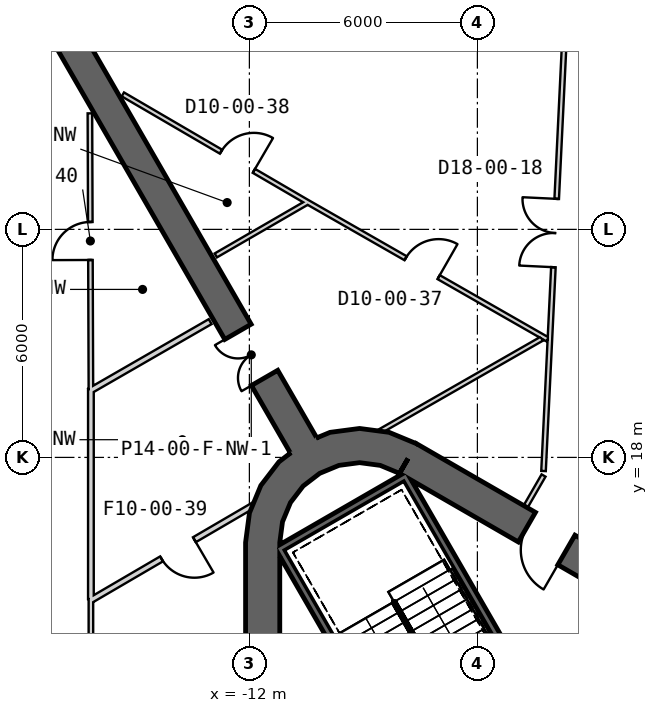
"""IFC4 building model, lengths in metres.
Left out: names, types, materials, properties, quantities, classifications, styles, units other than length and angle.
Written with IfcOpenShell. Run it as: python <this file> out.ifc"""

import sys

from ifc_helpers import new_model, si_unit, direction, frame, frame_2d, origin, place, context, subcontext, project, spatial, polyline, rectangle, outline, extrude, element, fill, save


model = new_model("IFC4")
c1 = context("Model", 3, precision=1e-05, world=origin(), true_north=direction((0.0, 1.0)))
c2 = subcontext(c1, "Body", "Model", "MODEL_VIEW")
j1 = project(units=[si_unit("LENGTHUNIT", "METRE"), si_unit("PLANEANGLEUNIT", "RADIAN")], contexts=[c1])
p1 = place(None, origin())
s1 = spatial("IfcSite", under=j1, at=p1, CompositionType="ELEMENT")
p2 = place(p1, origin())
s2 = spatial("IfcBuilding", under=s1, at=p2, CompositionType="ELEMENT")
p3 = place(p2, origin())
s3 = spatial("IfcBuildingStorey", under=s2, at=p3, CompositionType="ELEMENT", Elevation=0.0)
p4 = place(p3, frame((19.475, 2.208, 0.0), z_axis=(0.0, 0.0, 1.0), x_axis=(-0.866028369851, 0.499994862586, 0.0)))
e1 = element("IfcWall", 1, at=p4, inside=s3, PredefinedType="SHEAR", context=c2, shape_type="SweptSolid", body=[
    extrude(rectangle(XDim=31.523, YDim=0.9, at=frame_2d((15.762, 0.0))), origin(), (0.0, 0.0, 1.0), 9.0),
])
p5 = place(p4, frame((7.062, 0.0, 0.0)))
e2 = element("IfcOpeningElement", 2, at=p5, cuts=e1, PredefinedType="OPENING", context=c2, shape_type="SweptSolid", body=[
    extrude(rectangle(XDim=1.2, YDim=2.4, at=frame_2d((0.6, 1.2))), frame((0.0, 0.46, 0.0), z_axis=(0.0, -1.0, 0.0), x_axis=(1.0, 0.0, 0.0)), (0.0, 0.0, 1.0), 0.92),
])
p6 = place(p4, frame((9.762, 0.0, 0.0)))
e3 = element("IfcOpeningElement", 3, at=p6, cuts=e1, PredefinedType="OPENING", context=c2, shape_type="SweptSolid", body=[
    extrude(rectangle(XDim=1.2, YDim=2.4, at=frame_2d((0.6, 1.2))), frame((0.0, 0.46, 0.0), z_axis=(0.0, -1.0, 0.0), x_axis=(1.0, 0.0, 0.0)), (0.0, 0.0, 1.0), 0.92),
])
p7 = place(p4, frame((12.462, 0.0, 0.0)))
e4 = element("IfcOpeningElement", 4, at=p7, cuts=e1, PredefinedType="OPENING", context=c2, shape_type="SweptSolid", body=[
    extrude(rectangle(XDim=1.2, YDim=2.4, at=frame_2d((0.6, 1.2))), frame((0.0, 0.46, 0.0), z_axis=(0.0, -1.0, 0.0), x_axis=(1.0, 0.0, 0.0)), (0.0, 0.0, 1.0), 0.92),
])
p8 = place(p4, frame((15.162, 0.0, 0.0)))
e5 = element("IfcOpeningElement", 5, at=p8, cuts=e1, PredefinedType="OPENING", context=c2, shape_type="SweptSolid", body=[
    extrude(rectangle(XDim=1.2, YDim=2.4, at=frame_2d((0.6, 1.2))), frame((0.0, 0.46, 0.0), z_axis=(0.0, -1.0, 0.0), x_axis=(1.0, 0.0, 0.0)), (0.0, 0.0, 1.0), 0.92),
])
p9 = place(p4, frame((17.862, 0.0, 0.0)))
e6 = element("IfcOpeningElement", 6, at=p9, cuts=e1, PredefinedType="OPENING", context=c2, shape_type="SweptSolid", body=[
    extrude(rectangle(XDim=1.2, YDim=2.4, at=frame_2d((0.6, 1.2))), frame((0.0, 0.46, 0.0), z_axis=(0.0, -1.0, 0.0), x_axis=(1.0, 0.0, 0.0)), (0.0, 0.0, 1.0), 0.92),
])
p10 = place(p4, frame((20.562, 0.0, 0.0)))
e7 = element("IfcOpeningElement", 7, at=p10, cuts=e1, PredefinedType="OPENING", context=c2, shape_type="SweptSolid", body=[
    extrude(rectangle(XDim=1.2, YDim=2.4, at=frame_2d((0.6, 1.2))), frame((0.0, 0.46, 0.0), z_axis=(0.0, -1.0, 0.0), x_axis=(1.0, 0.0, 0.0)), (0.0, 0.0, 1.0), 0.92),
])
p11 = place(p4, frame((23.262, 0.0, 0.0)))
e8 = element("IfcOpeningElement", 8, at=p11, cuts=e1, PredefinedType="OPENING", context=c2, shape_type="SweptSolid", body=[
    extrude(rectangle(XDim=1.2, YDim=2.4, at=frame_2d((0.6, 1.2))), frame((0.0, 0.46, 0.0), z_axis=(0.0, -1.0, 0.0), x_axis=(1.0, 0.0, 0.0)), (0.0, 0.0, 1.0), 0.92),
])
p12 = place(p4, frame((3.612, 0.0, 0.0)))
e9 = element("IfcOpeningElement", 9, at=p12, cuts=e1, PredefinedType="OPENING", context=c2, shape_type="SweptSolid", body=[
    extrude(rectangle(XDim=1.2, YDim=2.4, at=frame_2d((0.6, 1.2))), frame((0.0, 0.46, 0.0), z_axis=(0.0, -1.0, 0.0), x_axis=(1.0, 0.0, 0.0)), (0.0, 0.0, 1.0), 0.92),
])
p13 = place(p4, frame((26.712, 0.0, 0.0)))
e10 = element("IfcOpeningElement", 10, at=p13, cuts=e1, PredefinedType="OPENING", context=c2, shape_type="SweptSolid", body=[
    extrude(rectangle(XDim=1.2, YDim=2.4, at=frame_2d((0.6, 1.2))), frame((0.0, 0.46, 0.0), z_axis=(0.0, -1.0, 0.0), x_axis=(1.0, 0.0, 0.0)), (0.0, 0.0, 1.0), 0.92),
])
p14 = place(p3, frame((-11.65, 15.762, 0.0), z_axis=(0.0, 0.0, 1.0), x_axis=(0.0, -1.0, 0.0)))
e11 = element("IfcWall", 11, at=p14, inside=s3, PredefinedType="SHEAR", context=c2, shape_type="SweptSolid", body=[
    extrude(rectangle(XDim=31.523, YDim=0.9, at=frame_2d((15.762, 0.0))), origin(), (0.0, 0.0, 1.0), 9.0),
])
p15 = place(p14, frame((7.062, 0.0, 0.0)))
e12 = element("IfcOpeningElement", 12, at=p15, cuts=e11, PredefinedType="OPENING", context=c2, shape_type="SweptSolid", body=[
    extrude(rectangle(XDim=1.2, YDim=2.4, at=frame_2d((0.6, 1.2))), frame((0.0, 0.46, 0.0), z_axis=(0.0, -1.0, 0.0), x_axis=(1.0, 0.0, 0.0)), (0.0, 0.0, 1.0), 0.92),
])
p16 = place(p14, frame((9.762, 0.0, 0.0)))
e13 = element("IfcOpeningElement", 13, at=p16, cuts=e11, PredefinedType="OPENING", context=c2, shape_type="SweptSolid", body=[
    extrude(rectangle(XDim=1.2, YDim=2.4, at=frame_2d((0.6, 1.2))), frame((0.0, 0.46, 0.0), z_axis=(0.0, -1.0, 0.0), x_axis=(1.0, 0.0, 0.0)), (0.0, 0.0, 1.0), 0.92),
])
p17 = place(p14, frame((12.462, 0.0, 0.0)))
e14 = element("IfcOpeningElement", 14, at=p17, cuts=e11, PredefinedType="OPENING", context=c2, shape_type="SweptSolid", body=[
    extrude(rectangle(XDim=1.2, YDim=2.4, at=frame_2d((0.6, 1.2))), frame((0.0, 0.46, 0.0), z_axis=(0.0, -1.0, 0.0), x_axis=(1.0, 0.0, 0.0)), (0.0, 0.0, 1.0), 0.92),
])
p18 = place(p14, frame((15.162, 0.0, 0.0)))
e15 = element("IfcOpeningElement", 15, at=p18, cuts=e11, PredefinedType="OPENING", context=c2, shape_type="SweptSolid", body=[
    extrude(rectangle(XDim=1.2, YDim=2.4, at=frame_2d((0.6, 1.2))), frame((0.0, 0.46, 0.0), z_axis=(0.0, -1.0, 0.0), x_axis=(1.0, 0.0, 0.0)), (0.0, 0.0, 1.0), 0.92),
])
p19 = place(p14, frame((17.862, 0.0, 0.0)))
e16 = element("IfcOpeningElement", 16, at=p19, cuts=e11, PredefinedType="OPENING", context=c2, shape_type="SweptSolid", body=[
    extrude(rectangle(XDim=1.2, YDim=2.4, at=frame_2d((0.6, 1.2))), frame((0.0, 0.46, 0.0), z_axis=(0.0, -1.0, 0.0), x_axis=(1.0, 0.0, 0.0)), (0.0, 0.0, 1.0), 0.92),
])
p20 = place(p14, frame((20.562, 0.0, 0.0)))
e17 = element("IfcOpeningElement", 17, at=p20, cuts=e11, PredefinedType="OPENING", context=c2, shape_type="SweptSolid", body=[
    extrude(rectangle(XDim=1.2, YDim=2.4, at=frame_2d((0.6, 1.2))), frame((0.0, 0.46, 0.0), z_axis=(0.0, -1.0, 0.0), x_axis=(1.0, 0.0, 0.0)), (0.0, 0.0, 1.0), 0.92),
])
p21 = place(p14, frame((23.262, 0.0, 0.0)))
e18 = element("IfcOpeningElement", 18, at=p21, cuts=e11, PredefinedType="OPENING", context=c2, shape_type="SweptSolid", body=[
    extrude(rectangle(XDim=1.2, YDim=2.4, at=frame_2d((0.6, 1.2))), frame((0.0, 0.46, 0.0), z_axis=(0.0, -1.0, 0.0), x_axis=(1.0, 0.0, 0.0)), (0.0, 0.0, 1.0), 0.92),
])
p22 = place(p14, frame((3.612, 0.0, 0.0)))
e19 = element("IfcOpeningElement", 19, at=p22, cuts=e11, PredefinedType="OPENING", context=c2, shape_type="SweptSolid", body=[
    extrude(rectangle(XDim=1.2, YDim=2.4, at=frame_2d((0.6, 1.2))), frame((0.0, 0.46, 0.0), z_axis=(0.0, -1.0, 0.0), x_axis=(1.0, 0.0, 0.0)), (0.0, 0.0, 1.0), 0.92),
])
p23 = place(p14, frame((26.712, 0.0, 0.0)))
e20 = element("IfcOpeningElement", 20, at=p23, cuts=e11, PredefinedType="OPENING", context=c2, shape_type="SweptSolid", body=[
    extrude(rectangle(XDim=1.2, YDim=2.4, at=frame_2d((0.6, 1.2))), frame((0.0, 0.46, 0.0), z_axis=(0.0, -1.0, 0.0), x_axis=(1.0, 0.0, 0.0)), (0.0, 0.0, 1.0), 0.92),
])
p24 = place(p3, origin())
e21 = element("IfcWall", 21, at=p24, inside=s3, PredefinedType="SHEAR", context=c2, shape_type="SweptSolid", body=[
    extrude(outline(polyline([(-7.6, 18.36), (-8.323, 18.659), (-9.1, 18.762), (-9.876, 18.659), (-10.6, 18.36), (-11.221, 17.883), (-11.698, 17.262), (-11.998, 16.538), (-12.1, 15.762), (-11.2, 15.762), (-11.128, 16.305), (-10.919, 16.812), (-10.585, 17.247), (-10.15, 17.58), (-9.644, 17.79), (-9.1, 17.862), (-8.556, 17.79), (-8.05, 17.58), (-7.6, 18.36)])), origin(), (0.0, 0.0, 1.0), 9.0),
])
p25 = place(p3, frame((-10.575, 18.316, 0.0), z_axis=(0.0, 0.0, 1.0), x_axis=(-0.499996575515, 0.866027380903, 0.0)))
e22 = element("IfcWall", 22, at=p25, inside=s3, PredefinedType="SHEAR", context=c2, shape_type="SweptSolid", body=[
    extrude(rectangle(XDim=13.954, YDim=0.8, at=frame_2d((6.977, 0.0))), origin(), (0.0, 0.0, 1.0), 9.0),
])
p26 = place(p25, frame((2.05, 0.0, 0.0)))
e23 = element("IfcOpeningElement", 23, at=p26, cuts=e22, PredefinedType="OPENING", context=c2, shape_type="SweptSolid", body=[
    extrude(rectangle(XDim=1.4, YDim=2.4, at=frame_2d((0.7, 1.2))), frame((0.0, 0.41, 0.0), z_axis=(0.0, -1.0, 0.0), x_axis=(1.0, 0.0, 0.0)), (0.0, 0.0, 1.0), 0.82),
])
p27 = place(p3, frame((-4.158, 11.696, 0.0), z_axis=(0.0, 0.0, 1.0), x_axis=(0.508018930956, 0.861345903683, 0.0)))
e24 = element("IfcWall", 24, at=p27, inside=s3, PredefinedType="PLUMBINGWALL", context=c2, shape_type="SweptSolid", body=[
    extrude(rectangle(XDim=3.15, YDim=0.2, at=frame_2d((1.575, 0.0))), origin(), (0.0, 0.0, 1.0), 8.7),
])
p28 = place(p3, frame((-11.245, 15.678, -0.4), z_axis=(0.0, 0.0, 1.0), x_axis=(0.499977274689, -0.866038523851, 0.0)))
e25 = element("IfcWall", 25, at=p28, inside=s3, PredefinedType="SHEAR", context=c2, shape_type="SweptSolid", body=[
    extrude(rectangle(XDim=8.1, YDim=0.2, at=frame_2d((4.05, 0.0))), origin(), (0.0, 0.0, 1.0), 9.1),
])
p29 = place(p3, frame((-7.818, 17.541, -0.4), z_axis=(0.0, 0.0, 1.0), x_axis=(-0.866044365799, -0.499967155389, 0.0)))
e26 = element("IfcWall", 26, at=p29, inside=s3, PredefinedType="SHEAR", context=c2, shape_type="SweptSolid", body=[
    extrude(rectangle(XDim=3.8, YDim=0.2, at=frame_2d((1.9, 0.0))), origin(), (0.0, 0.0, 1.0), 9.1),
])
p30 = place(p3, frame((-7.854, 17.405, -0.4), z_axis=(0.0, 0.0, 1.0), x_axis=(0.499997992926, -0.866026562566, 0.0)))
e27 = element("IfcWall", 27, at=p30, inside=s3, PredefinedType="SHEAR", context=c2, shape_type="SweptSolid", body=[
    extrude(rectangle(XDim=7.9, YDim=0.2, at=frame_2d((3.95, 0.0))), origin(), (0.0, 0.0, 1.0), 9.1),
])
p31 = place(p3, frame((-11.74, 16.832, 0.0), z_axis=(0.0, 0.0, 1.0), x_axis=(-0.863501067027, -0.504347010741, 0.0)))
e28 = element("IfcWall", 28, at=p31, inside=s3, PredefinedType="PLUMBINGWALL", context=c2, shape_type="SweptSolid", body=[
    extrude(rectangle(XDim=5.166, YDim=0.15, at=frame_2d((2.583, 0.0))), origin(), (0.0, 0.0, 1.0), 7.78),
])
p32 = place(p31, frame((1.977, 0.0, 0.0)))
e29 = element("IfcOpeningElement", 29, at=p32, cuts=e28, PredefinedType="OPENING", context=c2, shape_type="SweptSolid", body=[
    extrude(rectangle(XDim=1.0, YDim=2.1, at=frame_2d((0.5, 1.05))), frame((0.0, 0.085, 0.0), z_axis=(0.0, -1.0, 0.0), x_axis=(1.0, 0.0, 0.0)), (0.0, 0.0, 1.0), 0.17),
])
p33 = place(p3, frame((-16.17, 14.273, 0.0), z_axis=(0.0, 0.0, 1.0), x_axis=(0.0, -1.0, 0.0)))
e30 = element("IfcWall", 30, at=p33, inside=s3, PredefinedType="PARTITIONING", context=c2, shape_type="SweptSolid", body=[
    extrude(rectangle(XDim=26.35, YDim=0.12, at=frame_2d((13.175, 0.0))), origin(), (0.0, 0.0, 1.0), 8.08),
])
p34 = place(p33, frame((19.314, 0.0, 0.0)))
e31 = element("IfcOpeningElement", 31, at=p34, cuts=e30, PredefinedType="OPENING", context=c2, shape_type="SweptSolid", body=[
    extrude(rectangle(XDim=1.8, YDim=2.1, at=frame_2d((0.9, 1.05))), frame((0.0, 0.07, 0.0), z_axis=(0.0, -1.0, 0.0), x_axis=(1.0, 0.0, 0.0)), (0.0, 0.0, 1.0), 0.14),
])
p35 = place(p33, frame((12.314, 0.0, 0.0)))
e32 = element("IfcOpeningElement", 32, at=p35, cuts=e30, PredefinedType="OPENING", context=c2, shape_type="SweptSolid", body=[
    extrude(rectangle(XDim=1.8, YDim=2.1, at=frame_2d((0.9, 1.05))), frame((0.0, 0.07, 0.0), z_axis=(0.0, -1.0, 0.0), x_axis=(1.0, 0.0, 0.0)), (0.0, 0.0, 1.0), 0.14),
])
p36 = place(p33, frame((5.314, 0.0, 0.0)))
e33 = element("IfcOpeningElement", 33, at=p36, cuts=e30, PredefinedType="OPENING", context=c2, shape_type="SweptSolid", body=[
    extrude(rectangle(XDim=1.8, YDim=2.1, at=frame_2d((0.9, 1.05))), frame((0.0, 0.07, 0.0), z_axis=(0.0, -1.0, 0.0), x_axis=(1.0, 0.0, 0.0)), (0.0, 0.0, 1.0), 0.14),
])
p37 = place(p3, frame((-10.436, 24.731, 0.0), z_axis=(0.0, 0.0, 1.0), x_axis=(-0.865418403418, -0.501049884768, 0.0)))
e34 = element("IfcWall", 34, at=p37, inside=s3, PredefinedType="PARTITIONING", context=c2, shape_type="SweptSolid", body=[
    extrude(rectangle(XDim=2.828, YDim=0.12, at=frame_2d((1.414, 0.0))), origin(), (0.0, 0.0, 1.0), 8.7),
])
p38 = place(p3, frame((-10.492, 24.729, 0.0), z_axis=(0.0, 0.0, 1.0), x_axis=(0.868099034647, -0.496391041464, 0.0)))
e35 = element("IfcWall", 35, at=p38, inside=s3, PredefinedType="PARTITIONING", context=c2, shape_type="SweptSolid", body=[
    extrude(rectangle(XDim=7.3, YDim=0.12, at=frame_2d((3.65, 0.0))), origin(), (0.0, 0.0, 1.0), 7.78),
])
p39 = place(p38, frame((3.0, 0.0, 0.0)))
e36 = element("IfcOpeningElement", 36, at=p39, cuts=e35, PredefinedType="OPENING", context=c2, shape_type="SweptSolid", body=[
    extrude(rectangle(XDim=1.0, YDim=2.1, at=frame_2d((0.5, 1.05))), frame((0.0, 0.07, 0.0), z_axis=(0.0, -1.0, 0.0), x_axis=(1.0, 0.0, 0.0)), (0.0, 0.0, 1.0), 0.14),
])
p40 = place(p3, frame((-8.736, 18.588, 0.0), z_axis=(0.0, 0.0, 1.0), x_axis=(0.867892636673, 0.496751820539, 0.0)))
e37 = element("IfcWall", 37, at=p40, inside=s3, PredefinedType="PARTITIONING", context=c2, shape_type="SweptSolid", body=[
    extrude(rectangle(XDim=5.104, YDim=0.12, at=frame_2d((2.552, 0.0))), origin(), (0.0, 0.0, 1.0), 7.78),
])
p41 = place(p3, frame((-15.329, 27.551, 0.0), z_axis=(0.0, 0.0, 1.0), x_axis=(0.863752019717, -0.503917104725, 0.0)))
e38 = element("IfcWall", 38, at=p41, inside=s3, PredefinedType="PARTITIONING", context=c2, shape_type="SweptSolid", body=[
    extrude(rectangle(XDim=5.6, YDim=0.12, at=frame_2d((2.8, 0.0))), origin(), (0.0, 0.0, 1.0), 8.7),
])
p42 = place(p41, frame((2.992, 0.0, 0.0)))
e39 = element("IfcOpeningElement", 39, at=p42, cuts=e38, PredefinedType="OPENING", context=c2, shape_type="SweptSolid", body=[
    extrude(rectangle(XDim=1.0, YDim=2.1, at=frame_2d((0.5, 1.05))), frame((0.0, 0.07, 0.0), z_axis=(0.0, -1.0, 0.0), x_axis=(1.0, 0.0, 0.0)), (0.0, 0.0, 1.0), 0.14),
])
p43 = place(p3, frame((-13.032, 21.572, 0.0), z_axis=(0.0, 0.0, 1.0), x_axis=(-0.866491166515, -0.499192406143, 0.0)))
e40 = element("IfcWall", 40, at=p43, inside=s3, PredefinedType="PLUMBINGWALL", context=c2, shape_type="SweptSolid", body=[
    extrude(rectangle(XDim=3.656, YDim=0.15, at=frame_2d((1.828, 0.0))), origin(), (0.0, 0.0, 1.0), 7.78),
])
p44 = place(p3, frame((-16.17, 14.273, 0.0), z_axis=(0.0, 0.0, 1.0), x_axis=(0.0, 1.0, 0.0)))
e41 = element("IfcWall", 41, at=p44, inside=s3, PredefinedType="PLUMBINGWALL", context=c2, shape_type="SweptSolid", body=[
    extrude(rectangle(XDim=5.521, YDim=0.15, at=frame_2d((2.761, 0.0))), origin(), (0.0, 0.0, 1.0), 7.88),
])
p45 = place(p3, frame((-16.17, 19.795, 0.0), z_axis=(0.0, 0.0, 1.0), x_axis=(-0.003632670279, 0.999993401832, 0.0)))
e42 = element("IfcWall", 42, at=p45, inside=s3, PredefinedType="PARTITIONING", context=c2, shape_type="SweptSolid", body=[
    extrude(rectangle(XDim=7.258, YDim=0.12, at=frame_2d((3.629, 0.0))), origin(), (0.0, 0.0, 1.0), 7.78),
])
p46 = place(p45, frame((3.4, 0.0, 0.0)))
e43 = element("IfcOpeningElement", 43, at=p46, cuts=e42, PredefinedType="OPENING", context=c2, shape_type="SweptSolid", body=[
    extrude(rectangle(XDim=1.0, YDim=2.1, at=frame_2d((0.5, 1.05))), frame((0.0, 0.07, 0.0), z_axis=(0.0, -1.0, 0.0), x_axis=(1.0, 0.0, 0.0)), (0.0, 0.0, 1.0), 0.14),
])
p47 = place(p3, frame((-4.747, 16.678, 0.0), z_axis=(0.0, 0.0, 1.0), x_axis=(0.500011000363, 0.866019052629, 0.0)))
e44 = element("IfcWall", 44, at=p47, inside=s3, PredefinedType="PARTITIONING", context=c2, shape_type="SweptSolid", body=[
    extrude(rectangle(XDim=0.977, YDim=0.12, at=frame_2d((0.488, 0.0))), origin(), (0.0, 0.0, 1.0), 7.88),
])
p48 = place(p3, frame((-3.653, 30.171, 0.0), z_axis=(0.0, 0.0, 1.0), x_axis=(-0.048366881974, -0.99882963749, 0.0)))
e45 = element("IfcWall", 45, at=p48, inside=s3, PredefinedType="PARTITIONING", context=c2, shape_type="SweptSolid", body=[
    extrude(rectangle(XDim=12.543, YDim=0.12, at=frame_2d((6.272, 0.0))), origin(), (0.0, 0.0, 1.0), 7.88),
])
p49 = place(p48, frame((5.375, 0.0, 0.0)))
e46 = element("IfcOpeningElement", 46, at=p49, cuts=e45, PredefinedType="OPENING", context=c2, shape_type="SweptSolid", body=[
    extrude(rectangle(XDim=1.8, YDim=2.1, at=frame_2d((0.9, 1.05))), frame((0.0, 0.07, 0.0), z_axis=(0.0, -1.0, 0.0), x_axis=(1.0, 0.0, 0.0)), (0.0, 0.0, 1.0), 0.14),
])
p50 = place(p49, origin())
e47 = element("IfcDoor", 47, at=p50, inside=s3, OperationType="DOUBLE_DOOR_SINGLE_SWING", PredefinedType="NOTDEFINED", context=c2, shape_type="SweptSolid", body=[
    extrude(rectangle(XDim=1.8, YDim=2.1, at=frame_2d((0.9, 1.05))), frame((0.0, 0.025, 0.0), z_axis=(0.0, -1.0, 0.0), x_axis=(1.0, 0.0, 0.0)), (0.0, 0.0, 1.0), 0.05),
])
fill(e46, e47)
p51 = place(p39, origin())
e48 = element("IfcDoor", 48, at=p51, inside=s3, OperationType="SINGLE_SWING_RIGHT", PredefinedType="NOTDEFINED", context=c2, shape_type="SweptSolid", body=[
    extrude(rectangle(XDim=1.0, YDim=2.1, at=frame_2d((0.5, 1.05))), frame((0.0, 0.025, 0.0), z_axis=(0.0, -1.0, 0.0), x_axis=(1.0, 0.0, 0.0)), (0.0, 0.0, 1.0), 0.05),
])
fill(e36, e48)
p52 = place(p42, origin())
e49 = element("IfcDoor", 49, at=p52, inside=s3, OperationType="SINGLE_SWING_RIGHT", PredefinedType="NOTDEFINED", context=c2, shape_type="SweptSolid", body=[
    extrude(rectangle(XDim=1.0, YDim=2.1, at=frame_2d((0.5, 1.05))), frame((0.0, 0.025, 0.0), z_axis=(0.0, -1.0, 0.0), x_axis=(1.0, 0.0, 0.0)), (0.0, 0.0, 1.0), 0.05),
])
fill(e39, e49)
p53 = place(p32, origin())
e50 = element("IfcDoor", 50, at=p53, inside=s3, OperationType="SINGLE_SWING_LEFT", PredefinedType="USERDEFINED", context=c2, shape_type="SweptSolid", body=[
    extrude(rectangle(XDim=1.0, YDim=2.1, at=frame_2d((0.5, 1.05))), frame((0.0, 0.025, 0.0), z_axis=(0.0, -1.0, 0.0), x_axis=(1.0, 0.0, 0.0)), (0.0, 0.0, 1.0), 0.05),
])
fill(e29, e50)
p54 = place(p46, origin())
e51 = element("IfcDoor", 51, at=p54, inside=s3, OperationType="SINGLE_SWING_LEFT", PredefinedType="NOTDEFINED", context=c2, shape_type="SweptSolid", body=[
    extrude(rectangle(XDim=1.0, YDim=2.1, at=frame_2d((0.5, 1.05))), frame((0.0, 0.025, 0.0), z_axis=(0.0, -1.0, 0.0), x_axis=(1.0, 0.0, 0.0)), (0.0, 0.0, 1.0), 0.05),
])
fill(e43, e51)
p55 = place(p13, origin())
e52 = element("IfcDoor", 52, at=p55, inside=s3, OperationType="SINGLE_SWING_LEFT", PredefinedType="USERDEFINED", context=c2, shape_type="SweptSolid", body=[
    extrude(rectangle(XDim=1.2, YDim=2.4, at=frame_2d((0.6, 1.2))), frame((0.0, 0.025, 0.0), z_axis=(0.0, -1.0, 0.0), x_axis=(1.0, 0.0, 0.0)), (0.0, 0.0, 1.0), 0.05),
])
fill(e10, e52)
p56 = place(p26, origin())
e53 = element("IfcDoor", 53, at=p56, inside=s3, OperationType="DOUBLE_DOOR_SINGLE_SWING", PredefinedType="NOTDEFINED", context=c2, shape_type="SweptSolid", body=[
    extrude(rectangle(XDim=1.4, YDim=2.4, at=frame_2d((0.7, 1.2))), frame((0.0, 0.025, 0.0), z_axis=(0.0, -1.0, 0.0), x_axis=(1.0, 0.0, 0.0)), (0.0, 0.0, 1.0), 0.05),
])
fill(e23, e53)
save(model, sys.argv[1])
